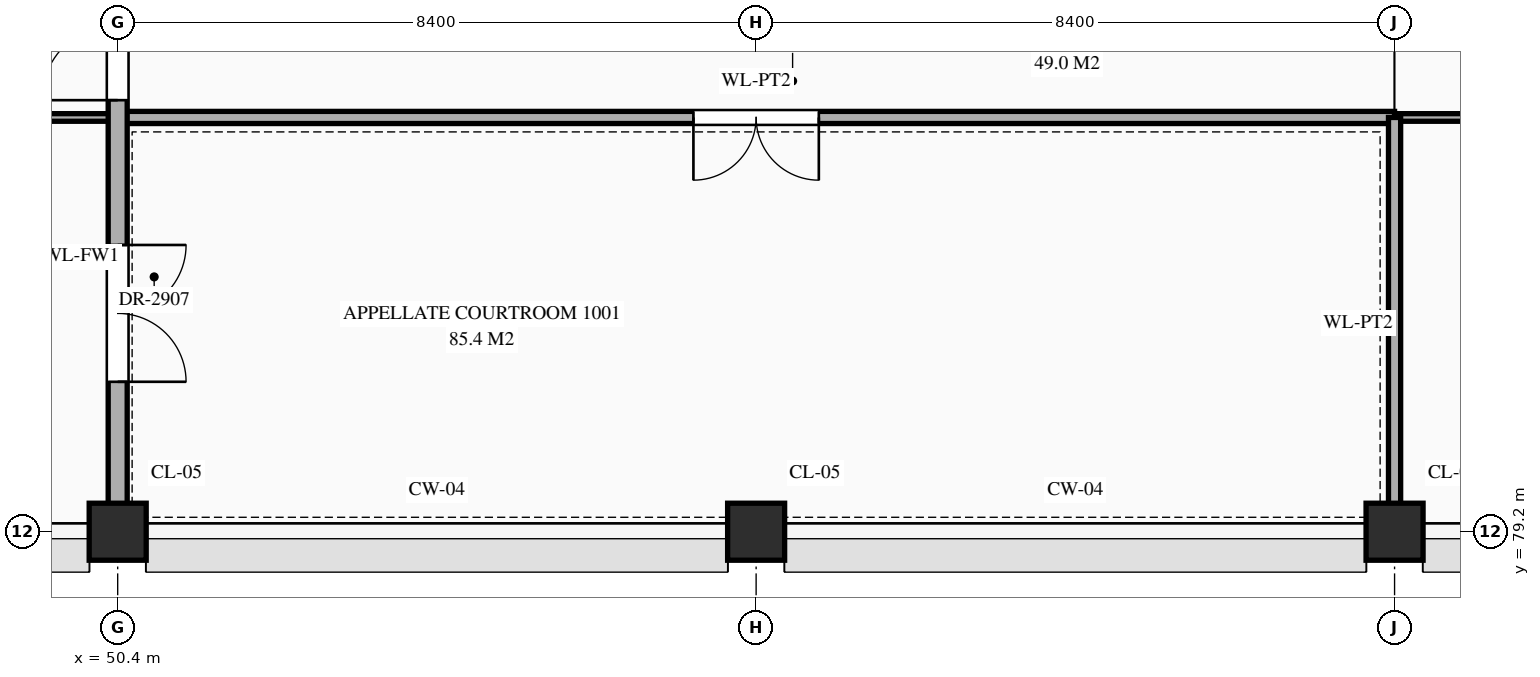
"""IFC4 building model, lengths in metres.
Left out: names, types, materials, properties, quantities, classifications, styles, units other than length and angle.
Written with IfcOpenShell. Run it as: python <this file> out.ifc"""

import sys

from ifc_helpers import new_model, si_unit, direction, frame, frame_2d, origin, origin_2d, place, context, subcontext, project, spatial, rectangle, extrude, element, fill, save


model = new_model("IFC4")
c1 = context("Model", 3, precision=1e-05, world=origin(), true_north=direction((0.0, 1.0)))
c2 = subcontext(c1, "Body", "Model", "MODEL_VIEW")
j1 = project(units=[si_unit("LENGTHUNIT", "METRE"), si_unit("PLANEANGLEUNIT", "RADIAN")], contexts=[c1])
p1 = place(None, origin())
s1 = spatial("IfcSite", under=j1, at=p1, CompositionType="ELEMENT")
p2 = place(p1, origin())
s2 = spatial("IfcBuilding", under=s1, at=p2, CompositionType="ELEMENT")
p3 = place(p2, frame((0.0, 0.0, 43.5)))
s3 = spatial("IfcBuildingStorey", under=s2, at=p3, CompositionType="ELEMENT", Elevation=43.5)
for number, where, z_axis, x_axis in (
    (1, (50.4, 79.2, 0.0), (0.0, 0.0, 1.0), (1.0, 0.0, 0.0)),
    (2, (58.8, 79.2, 0.0), (0.0, 0.0, 1.0), (1.0, 0.0, 0.0)),
    (3, (67.2, 79.2, 0.0), (0.0, 0.0, 1.0), (1.0, 0.0, 0.0)),
):
    element("IfcColumn", number, at=place(p3, frame(where, z_axis=z_axis, x_axis=x_axis)), inside=s3, PredefinedType="COLUMN", context=c2, shape_type="SweptSolid", body=[
        extrude(rectangle(XDim=0.75, YDim=0.75, at=origin_2d()), origin(), (0.0, 0.0, 1.0), 4.2),
    ])
p4 = place(p3, frame((42.04, 84.65, 0.0), z_axis=(0.0, 0.0, 1.0), x_axis=(1.0, 0.0, 0.0)))
e4 = element("IfcWall", 4, at=p4, inside=s3, PredefinedType="STANDARD", context=c2, shape_type="SweptSolid", body=[
    extrude(rectangle(XDim=8.36, YDim=0.1, at=frame_2d((4.18, 0.0))), origin(), (0.0, 0.0, 1.0), 4.0),
])
p5 = place(p4, frame((3.23, 0.0, 0.0)))
e5 = element("IfcOpeningElement", 5, at=p5, cuts=e4, PredefinedType="OPENING", context=c2, shape_type="SweptSolid", body=[
    extrude(rectangle(XDim=1.9, YDim=2.5, at=frame_2d((0.95, 1.25))), frame((0.0, 0.062, 0.0), z_axis=(0.0, -1.0, 0.0), x_axis=(1.0, 0.0, 0.0)), (0.0, 0.0, 1.0), 0.124),
])
p6 = place(p3, frame((50.4, 84.65, 0.0), z_axis=(0.0, 0.0, 1.0), x_axis=(1.0, 0.0, 0.0)))
e6 = element("IfcWall", 6, at=p6, inside=s3, PredefinedType="STANDARD", context=c2, shape_type="SweptSolid", body=[
    extrude(rectangle(XDim=16.8, YDim=0.16, at=frame_2d((8.4, 0.0))), origin(), (0.0, 0.0, 1.0), 3.95),
])
p7 = place(p6, frame((7.575, 0.0, 0.0)))
e7 = element("IfcOpeningElement", 7, at=p7, cuts=e6, PredefinedType="OPENING", context=c2, shape_type="SweptSolid", body=[
    extrude(rectangle(XDim=1.65, YDim=2.4, at=frame_2d((0.825, 1.2))), frame((0.0, 0.092, 0.0), z_axis=(0.0, -1.0, 0.0), x_axis=(1.0, 0.0, 0.0)), (0.0, 0.0, 1.0), 0.184),
])
p8 = place(p3, frame((67.2, 84.65, 0.0), z_axis=(0.0, 0.0, 1.0), x_axis=(1.0, 0.0, 0.0)))
e8 = element("IfcWall", 8, at=p8, inside=s3, PredefinedType="STANDARD", context=c2, shape_type="SweptSolid", body=[
    extrude(rectangle(XDim=33.6, YDim=0.1, at=frame_2d((16.8, 0.0))), origin(), (0.0, 0.0, 1.0), 3.95),
])
p9 = place(p8, frame((7.625, 0.0, 0.0)))
e9 = element("IfcOpeningElement", 9, at=p9, cuts=e8, PredefinedType="OPENING", context=c2, shape_type="SweptSolid", body=[
    extrude(rectangle(XDim=1.55, YDim=2.35, at=frame_2d((0.775, 1.175))), frame((0.0, 0.062, 0.0), z_axis=(0.0, -1.0, 0.0), x_axis=(1.0, 0.0, 0.0)), (0.0, 0.0, 1.0), 0.124),
])
p10 = place(p8, frame((24.475, 0.0, 0.0)))
e10 = element("IfcOpeningElement", 10, at=p10, cuts=e8, PredefinedType="OPENING", context=c2, shape_type="SweptSolid", body=[
    extrude(rectangle(XDim=1.45, YDim=2.3, at=frame_2d((0.725, 1.15))), frame((0.0, 0.062, 0.0), z_axis=(0.0, -1.0, 0.0), x_axis=(1.0, 0.0, 0.0)), (0.0, 0.0, 1.0), 0.124),
])
p11 = place(p3, frame((50.4, 79.24, 0.0), z_axis=(0.0, 0.0, 1.0), x_axis=(0.0, 1.0, 0.0)))
e11 = element("IfcWall", 11, at=p11, inside=s3, PredefinedType="STANDARD", context=c2, shape_type="SweptSolid", body=[
    extrude(rectangle(XDim=7.16, YDim=0.25, at=frame_2d((3.58, 0.0))), origin(), (0.0, 0.0, 1.0), 3.2),
])
p12 = place(p11, frame((5.637, 0.0, 0.0)))
e12 = element("IfcOpeningElement", 12, at=p12, cuts=e11, PredefinedType="OPENING", context=c2, shape_type="SweptSolid", body=[
    extrude(rectangle(XDim=1.0, YDim=2.2, at=frame_2d((0.5, 1.1))), frame((0.0, 0.137, 0.0), z_axis=(0.0, -1.0, 0.0), x_axis=(1.0, 0.0, 0.0)), (0.0, 0.0, 1.0), 0.274),
])
p13 = place(p11, frame((1.933, 0.0, 0.0)))
e13 = element("IfcOpeningElement", 13, at=p13, cuts=e11, PredefinedType="OPENING", context=c2, shape_type="SweptSolid", body=[
    extrude(rectangle(XDim=1.8, YDim=2.35, at=frame_2d((0.9, 1.175))), frame((0.0, 0.137, 0.0), z_axis=(0.0, -1.0, 0.0), x_axis=(1.0, 0.0, 0.0)), (0.0, 0.0, 1.0), 0.274),
])
p14 = place(p3, frame((67.2, 79.24, 0.0), z_axis=(0.0, 0.0, 1.0), x_axis=(0.0, 1.0, 0.0)))
e14 = element("IfcWall", 14, at=p14, inside=s3, PredefinedType="STANDARD", context=c2, shape_type="SweptSolid", body=[
    extrude(rectangle(XDim=5.41, YDim=0.16, at=frame_2d((2.705, 0.0))), origin(), (0.0, 0.0, 1.0), 3.2),
])
p15 = place(p12, origin())
e15 = element("IfcDoor", 15, at=p15, inside=s3, OperationType="SINGLE_SWING_LEFT", PredefinedType="DOOR", context=c2, shape_type="SweptSolid", body=[
    extrude(rectangle(XDim=1.0, YDim=2.2, at=frame_2d((0.5, 1.1))), frame((0.0, 0.025, 0.0), z_axis=(0.0, -1.0, 0.0), x_axis=(1.0, 0.0, 0.0)), (0.0, 0.0, 1.0), 0.05),
])
fill(e12, e15)
p16 = place(p7, frame((1.65, 0.0, 0.0), z_axis=(0.0, 0.0, 1.0), x_axis=(-1.0, 0.0, 0.0)))
e16 = element("IfcDoor", 16, at=p16, inside=s3, OperationType="DOUBLE_DOOR_SINGLE_SWING", PredefinedType="DOOR", context=c2, shape_type="SweptSolid", body=[
    extrude(rectangle(XDim=1.65, YDim=2.4, at=frame_2d((0.825, 1.2))), frame((0.0, 0.025, 0.0), z_axis=(0.0, -1.0, 0.0), x_axis=(1.0, 0.0, 0.0)), (0.0, 0.0, 1.0), 0.05),
])
fill(e7, e16)
p17 = place(p13, frame((1.8, 0.0, 0.0), z_axis=(0.0, 0.0, 1.0), x_axis=(-1.0, 0.0, 0.0)))
e17 = element("IfcDoor", 17, at=p17, inside=s3, OperationType="DOUBLE_DOOR_SINGLE_SWING", PredefinedType="DOOR", context=c2, shape_type="SweptSolid", body=[
    extrude(rectangle(XDim=1.8, YDim=2.35, at=frame_2d((0.9, 1.175))), frame((0.0, 0.025, 0.0), z_axis=(0.0, -1.0, 0.0), x_axis=(1.0, 0.0, 0.0)), (0.0, 0.0, 1.0), 0.05),
])
fill(e13, e17)
save(model, sys.argv[1])
